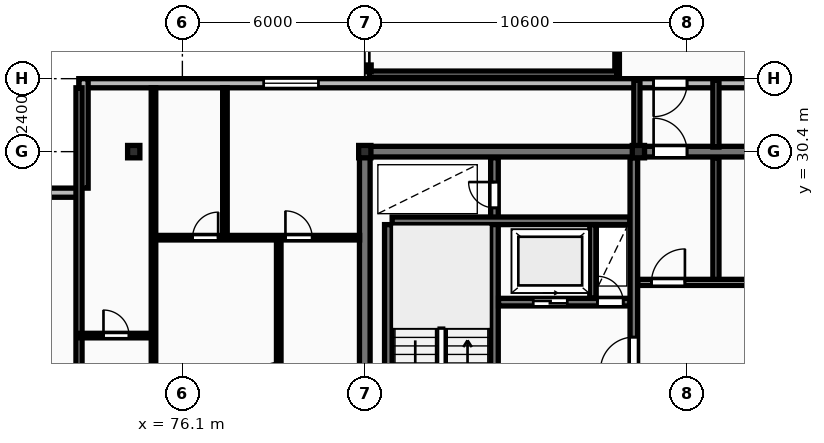
"""IFC4 building model, lengths in metres.
Left out: names, types, materials, properties, quantities, classifications, styles, units other than length and angle.
Written with IfcOpenShell. Run it as: python <this file> out.ifc"""

import sys

from ifc_helpers import new_model, si_unit, direction, frame, frame_2d, origin, origin_2d, place, context, subcontext, project, spatial, rectangle, i_section, extrude, element, fill, save


model = new_model("IFC4")
c1 = context("Model", 3, precision=1e-05, world=origin(), true_north=direction((0.0, 1.0)))
c2 = subcontext(c1, "Body", "Model", "MODEL_VIEW")
j1 = project(units=[si_unit("LENGTHUNIT", "METRE"), si_unit("PLANEANGLEUNIT", "RADIAN")], contexts=[c1])
p1 = place(None, origin())
s1 = spatial("IfcSite", under=j1, at=p1, CompositionType="ELEMENT")
p2 = place(p1, origin())
s2 = spatial("IfcBuilding", under=s1, at=p2, CompositionType="ELEMENT")
p3 = place(p2, frame((0.0, 0.0, 153.7)))
s3 = spatial("IfcBuildingStorey", under=s2, at=p3, CompositionType="ELEMENT", Elevation=153.7)
for number, where, z_axis, x_axis in (
    (1, (74.5, 30.4, 0.0), (0.0, 0.0, 1.0), (1.0, 0.0, 0.0)),
    (2, (82.1, 30.4, 0.0), (0.0, 0.0, 1.0), (1.0, 0.0, 0.0)),
    (3, (91.1, 30.4, 0.0), (0.0, 0.0, 1.0), (1.0, 0.0, 0.0)),
):
    element("IfcColumn", number, at=place(p3, frame(where, z_axis=z_axis, x_axis=x_axis)), inside=s3, PredefinedType="COLUMN", context=c2, shape_type="SweptSolid", body=[
        extrude(i_section(OverallWidth=0.403, OverallDepth=0.406, WebThickness=0.027, FlangeThickness=0.043, FilletRadius=0.015, at=origin_2d()), origin(), (0.0, 0.0, 1.0), 3.6),
    ])
p4 = place(p3, frame((130.7, 32.65, 0.0), z_axis=(0.0, 0.0, 1.0), x_axis=(-1.0, 0.0, 0.0)))
e4 = element("IfcWall", 4, at=p4, inside=s3, PredefinedType="STANDARD", context=c2, shape_type="SweptSolid", body=[
    extrude(rectangle(XDim=58.0, YDim=0.3, at=frame_2d((29.0, 0.0))), origin(), (0.0, 0.0, 1.0), 3.32),
])
p5 = place(p4, frame((50.125, 0.0, 0.85)))
e5 = element("IfcOpeningElement", 5, at=p5, cuts=e4, PredefinedType="OPENING", context=c2, shape_type="SweptSolid", body=[
    extrude(rectangle(XDim=1.8, YDim=1.8, at=frame_2d((0.9, 0.9))), frame((0.0, 0.16, 0.0), z_axis=(0.0, -1.0, 0.0), x_axis=(1.0, 0.0, 0.0)), (0.0, 0.0, 1.0), 0.32),
])
p6 = place(p4, frame((6.775, 0.0, 0.85)))
e6 = element("IfcOpeningElement", 6, at=p6, cuts=e4, PredefinedType="OPENING", context=c2, shape_type="SweptSolid", body=[
    extrude(rectangle(XDim=1.8, YDim=1.8, at=frame_2d((0.9, 0.9))), frame((0.0, 0.16, 0.0), z_axis=(0.0, -1.0, 0.0), x_axis=(1.0, 0.0, 0.0)), (0.0, 0.0, 1.0), 0.32),
])
p7 = place(p4, frame((38.0, 0.0, 0.0)))
e7 = element("IfcOpeningElement", 7, at=p7, cuts=e4, PredefinedType="OPENING", context=c2, shape_type="SweptSolid", body=[
    extrude(rectangle(XDim=1.1, YDim=2.1, at=frame_2d((0.55, 1.05))), frame((0.0, 0.16, 0.0), z_axis=(0.0, -1.0, 0.0), x_axis=(1.0, 0.0, 0.0)), (0.0, 0.0, 1.0), 0.32),
])
p8 = place(p3, frame((72.85, 32.8, 0.0), z_axis=(0.0, 0.0, 1.0), x_axis=(0.0, -1.0, 0.0)))
e8 = element("IfcWall", 8, at=p8, inside=s3, PredefinedType="STANDARD", context=c2, shape_type="SweptSolid", body=[
    extrude(rectangle(XDim=3.6, YDim=0.3, at=frame_2d((1.8, 0.0))), origin(), (0.0, 0.0, 1.0), 3.32),
])
p9 = place(p3, frame((72.7, 29.05, 0.0), z_axis=(0.0, 0.0, 1.0), x_axis=(-1.0, 0.0, 0.0)))
e9 = element("IfcWall", 9, at=p9, inside=s3, PredefinedType="STANDARD", context=c2, shape_type="SweptSolid", body=[
    extrude(rectangle(XDim=3.6, YDim=0.3, at=frame_2d((1.8, 0.0))), origin(), (0.0, 0.0, 1.0), 3.32),
])
p10 = place(p3, frame((81.925, 30.4, 0.0), z_axis=(0.0, 0.0, 1.0), x_axis=(1.0, 0.0, 0.0)))
e10 = element("IfcWall", 10, at=p10, inside=s3, PredefinedType="SHEAR", context=c2, shape_type="SweptSolid", body=[
    extrude(rectangle(XDim=36.265, YDim=0.35, at=frame_2d((18.132, 0.0))), origin(), (0.0, 0.0, 1.0), 3.6),
])
p11 = place(p10, frame((9.675, 0.0, 0.0)))
e11 = element("IfcOpeningElement", 11, at=p11, cuts=e10, PredefinedType="OPENING", context=c2, shape_type="SweptSolid", body=[
    extrude(rectangle(XDim=1.1, YDim=2.1, at=frame_2d((0.55, 1.05))), frame((0.0, 0.185, 0.0), z_axis=(0.0, -1.0, 0.0), x_axis=(1.0, 0.0, 0.0)), (0.0, 0.0, 1.0), 0.37),
])
p12 = place(p3, frame((82.1, 18.575, 0.0), z_axis=(0.0, 0.0, 1.0), x_axis=(0.0, 1.0, 0.0)))
e12 = element("IfcWall", 12, at=p12, inside=s3, PredefinedType="SHEAR", context=c2, shape_type="SweptSolid", body=[
    extrude(rectangle(XDim=11.65, YDim=0.35, at=frame_2d((5.825, 0.0))), origin(), (0.0, 0.0, 1.0), 3.6),
])
p13 = place(p3, frame((82.875, 20.4, 0.0), z_axis=(0.0, 0.0, 1.0), x_axis=(0.0, 1.0, 0.0)))
e13 = element("IfcWall", 13, at=p13, inside=s3, PredefinedType="SHEAR", context=c2, shape_type="SweptSolid", body=[
    extrude(rectangle(XDim=7.6, YDim=0.25, at=frame_2d((3.8, 0.0))), origin(), (0.0, 0.0, 1.0), 3.6),
])
p14 = place(p3, frame((86.365, 18.6, 0.0), z_axis=(0.0, 0.0, 1.0), x_axis=(0.0, 1.0, 0.0)))
e14 = element("IfcWall", 14, at=p14, inside=s3, PredefinedType="SHEAR", context=c2, shape_type="SweptSolid", body=[
    extrude(rectangle(XDim=11.6, YDim=0.25, at=frame_2d((5.8, 0.0))), origin(), (0.0, 0.0, 1.0), 3.6),
])
p15 = place(p14, frame((0.45, 0.0, 0.0)))
e15 = element("IfcOpeningElement", 15, at=p15, cuts=e14, PredefinedType="OPENING", context=c2, shape_type="SweptSolid", body=[
    extrude(rectangle(XDim=0.85, YDim=2.05, at=frame_2d((0.425, 1.025))), frame((0.0, 0.135, 0.0), z_axis=(0.0, -1.0, 0.0), x_axis=(1.0, 0.0, 0.0)), (0.0, 0.0, 1.0), 0.27),
])
p16 = place(p14, frame((2.05, 0.0, 0.0)))
e16 = element("IfcOpeningElement", 16, at=p16, cuts=e14, PredefinedType="OPENING", context=c2, shape_type="SweptSolid", body=[
    extrude(rectangle(XDim=1.1, YDim=2.1, at=frame_2d((0.55, 1.05))), frame((0.0, 0.135, 0.0), z_axis=(0.0, -1.0, 0.0), x_axis=(1.0, 0.0, 0.0)), (0.0, 0.0, 1.0), 0.27),
])
p17 = place(p14, frame((9.95, 0.0, 0.0)))
e17 = element("IfcOpeningElement", 17, at=p17, cuts=e14, PredefinedType="OPENING", context=c2, shape_type="SweptSolid", body=[
    extrude(rectangle(XDim=0.85, YDim=2.05, at=frame_2d((0.425, 1.025))), frame((0.0, 0.135, 0.0), z_axis=(0.0, -1.0, 0.0), x_axis=(1.0, 0.0, 0.0)), (0.0, 0.0, 1.0), 0.27),
])
p18 = place(p3, frame((83.0, 28.125, 0.0), z_axis=(0.0, 0.0, 1.0), x_axis=(1.0, 0.0, 0.0)))
e18 = element("IfcWall", 18, at=p18, inside=s3, PredefinedType="SHEAR", context=c2, shape_type="SweptSolid", body=[
    extrude(rectangle(XDim=7.82, YDim=0.25, at=frame_2d((3.91, 0.0))), origin(), (0.0, 0.0, 1.0), 3.6),
])
p19 = place(p3, frame((86.5, 25.45, 0.0), z_axis=(0.0, 0.0, 1.0), x_axis=(1.0, 0.0, 0.0)))
e19 = element("IfcWall", 19, at=p19, inside=s3, PredefinedType="SHEAR", context=c2, shape_type="SweptSolid", body=[
    extrude(rectangle(XDim=4.32, YDim=0.25, at=frame_2d((2.16, 0.0))), origin(), (0.0, 0.0, 1.0), 3.6),
])
p20 = place(p19, frame((1.14, 0.0, 0.0)))
e20 = element("IfcOpeningElement", 20, at=p20, cuts=e19, PredefinedType="OPENING", context=c2, shape_type="SweptSolid", body=[
    extrude(rectangle(XDim=1.12, YDim=2.12, at=frame_2d((0.56, 1.06))), frame((0.0, 0.135, 0.0), z_axis=(0.0, -1.0, 0.0), x_axis=(1.0, 0.0, 0.0)), (0.0, 0.0, 1.0), 0.27),
])
p21 = place(p19, frame((3.25, 0.0, 0.0)))
e21 = element("IfcOpeningElement", 21, at=p21, cuts=e19, PredefinedType="OPENING", context=c2, shape_type="SweptSolid", body=[
    extrude(rectangle(XDim=0.85, YDim=2.05, at=frame_2d((0.425, 1.025))), frame((0.0, 0.135, 0.0), z_axis=(0.0, -1.0, 0.0), x_axis=(1.0, 0.0, 0.0)), (0.0, 0.0, 1.0), 0.27),
])
p22 = place(p3, frame((89.6, 25.58, 0.0), z_axis=(0.0, 0.0, 1.0), x_axis=(0.0, 1.0, 0.0)))
e22 = element("IfcWall", 22, at=p22, inside=s3, PredefinedType="PARTITIONING", context=c2, shape_type="SweptSolid", body=[
    extrude(rectangle(XDim=2.42, YDim=0.2, at=frame_2d((1.21, 0.0))), origin(), (0.0, 0.0, 1.0), 3.32),
])
p23 = place(p3, frame((90.95, 18.6, 0.0), z_axis=(0.0, 0.0, 1.0), x_axis=(0.0, 1.0, 0.0)))
e23 = element("IfcWall", 23, at=p23, inside=s3, PredefinedType="SHEAR", context=c2, shape_type="SweptSolid", body=[
    extrude(rectangle(XDim=11.6, YDim=0.25, at=frame_2d((5.8, 0.0))), origin(), (0.0, 0.0, 1.0), 3.6),
])
p24 = place(p23, frame((4.6, 0.0, 0.0)))
e24 = element("IfcOpeningElement", 24, at=p24, cuts=e23, PredefinedType="OPENING", context=c2, shape_type="SweptSolid", body=[
    extrude(rectangle(XDim=1.1, YDim=2.1, at=frame_2d((0.55, 1.05))), frame((0.0, 0.135, 0.0), z_axis=(0.0, -1.0, 0.0), x_axis=(1.0, 0.0, 0.0)), (0.0, 0.0, 1.0), 0.27),
])
p25 = place(p3, frame((93.65, 26.1, 0.0), z_axis=(0.0, 0.0, 1.0), x_axis=(0.0, 1.0, 0.0)))
e25 = element("IfcWall", 25, at=p25, inside=s3, PredefinedType="PARTITIONING", context=c2, shape_type="SweptSolid", body=[
    extrude(rectangle(XDim=4.1, YDim=0.2, at=frame_2d((2.05, 0.0))), origin(), (0.0, 0.0, 1.0), 3.32),
])
p26 = place(p3, frame((91.08, 26.1, 0.0), z_axis=(0.0, 0.0, 1.0), x_axis=(1.0, 0.0, 0.0)))
e26 = element("IfcWall", 26, at=p26, inside=s3, PredefinedType="PARTITIONING", context=c2, shape_type="SweptSolid", body=[
    extrude(rectangle(XDim=8.34, YDim=0.2, at=frame_2d((4.17, 0.0))), origin(), (0.0, 0.0, 1.0), 3.32),
])
p27 = place(p26, frame((0.45, 0.0, 0.0)))
e27 = element("IfcOpeningElement", 27, at=p27, cuts=e26, PredefinedType="OPENING", context=c2, shape_type="SweptSolid", body=[
    extrude(rectangle(XDim=1.1, YDim=2.1, at=frame_2d((0.55, 1.05))), frame((0.0, 0.11, 0.0), z_axis=(0.0, -1.0, 0.0), x_axis=(1.0, 0.0, 0.0)), (0.0, 0.0, 1.0), 0.22),
])
p28 = place(p26, frame((4.6, 0.0, 0.0)))
e28 = element("IfcOpeningElement", 28, at=p28, cuts=e26, PredefinedType="OPENING", context=c2, shape_type="SweptSolid", body=[
    extrude(rectangle(XDim=0.92, YDim=2.08, at=frame_2d((0.46, 1.04))), frame((0.0, 0.11, 0.0), z_axis=(0.0, -1.0, 0.0), x_axis=(1.0, 0.0, 0.0)), (0.0, 0.0, 1.0), 0.22),
])
p29 = place(p3, frame((72.7, 18.4, 0.0), z_axis=(0.0, 0.0, 1.0), x_axis=(0.0, 1.0, 0.0)))
e29 = element("IfcWall", 29, at=p29, inside=s3, PredefinedType="PARTITIONING", context=c2, shape_type="SweptSolid", body=[
    extrude(rectangle(XDim=14.1, YDim=0.2, at=frame_2d((7.05, 0.0))), origin(), (0.0, 0.0, 1.0), 3.32),
])
p30 = place(p3, frame((72.7, 24.35, 0.0), z_axis=(0.0, 0.0, 1.0), x_axis=(1.0, 0.0, 0.0)))
e30 = element("IfcWall", 30, at=p30, inside=s3, PredefinedType="PARTITIONING", context=c2, shape_type="SweptSolid", body=[
    extrude(rectangle(XDim=2.45, YDim=0.15, at=frame_2d((1.225, 0.0))), origin(), (0.0, 0.0, 1.0), 3.32),
])
p31 = place(p30, frame((0.805, 0.0, 0.0)))
e31 = element("IfcOpeningElement", 31, at=p31, cuts=e30, PredefinedType="OPENING", context=c2, shape_type="SweptSolid", body=[
    extrude(rectangle(XDim=0.84, YDim=2.04, at=frame_2d((0.42, 1.02))), frame((0.0, 0.085, 0.0), z_axis=(0.0, -1.0, 0.0), x_axis=(1.0, 0.0, 0.0)), (0.0, 0.0, 1.0), 0.17),
])
p32 = place(p3, frame((75.15, 18.45, 0.0), z_axis=(0.0, 0.0, 1.0), x_axis=(0.0, 1.0, 0.0)))
e32 = element("IfcWall", 32, at=p32, inside=s3, PredefinedType="PARTITIONING", context=c2, shape_type="SweptSolid", body=[
    extrude(rectangle(XDim=14.05, YDim=0.15, at=frame_2d((7.025, 0.0))), origin(), (0.0, 0.0, 1.0), 3.32),
])
p33 = place(p32, frame((3.32, 0.0, 0.0)))
e33 = element("IfcOpeningElement", 33, at=p33, cuts=e32, PredefinedType="OPENING", context=c2, shape_type="SweptSolid", body=[
    extrude(rectangle(XDim=0.88, YDim=2.06, at=frame_2d((0.44, 1.03))), frame((0.0, 0.085, 0.0), z_axis=(0.0, -1.0, 0.0), x_axis=(1.0, 0.0, 0.0)), (0.0, 0.0, 1.0), 0.17),
])
p34 = place(p3, frame((79.27, 18.45, 0.0), z_axis=(0.0, 0.0, 1.0), x_axis=(0.0, 1.0, 0.0)))
e34 = element("IfcWall", 34, at=p34, inside=s3, PredefinedType="PARTITIONING", context=c2, shape_type="SweptSolid", body=[
    extrude(rectangle(XDim=9.12, YDim=0.15, at=frame_2d((4.56, 0.0))), origin(), (0.0, 0.0, 1.0), 3.32),
])
p35 = place(p34, frame((4.1, 0.0, 0.0)))
e35 = element("IfcOpeningElement", 35, at=p35, cuts=e34, PredefinedType="OPENING", context=c2, shape_type="SweptSolid", body=[
    extrude(rectangle(XDim=0.92, YDim=2.08, at=frame_2d((0.46, 1.04))), frame((0.0, 0.085, 0.0), z_axis=(0.0, -1.0, 0.0), x_axis=(1.0, 0.0, 0.0)), (0.0, 0.0, 1.0), 0.17),
])
p36 = place(p3, frame((77.5, 27.57, 0.0), z_axis=(0.0, 0.0, 1.0), x_axis=(0.0, 1.0, 0.0)))
e36 = element("IfcWall", 36, at=p36, inside=s3, PredefinedType="PARTITIONING", context=c2, shape_type="SweptSolid", body=[
    extrude(rectangle(XDim=4.93, YDim=0.15, at=frame_2d((2.465, 0.0))), origin(), (0.0, 0.0, 1.0), 3.32),
])
p37 = place(p3, frame((75.17, 27.57, 0.0), z_axis=(0.0, 0.0, 1.0), x_axis=(1.0, 0.0, 0.0)))
e37 = element("IfcWall", 37, at=p37, inside=s3, PredefinedType="PARTITIONING", context=c2, shape_type="SweptSolid", body=[
    extrude(rectangle(XDim=6.76, YDim=0.15, at=frame_2d((3.38, 0.0))), origin(), (0.0, 0.0, 1.0), 3.32),
])
p38 = place(p37, frame((1.266, 0.0, 0.0)))
e38 = element("IfcOpeningElement", 38, at=p38, cuts=e37, PredefinedType="OPENING", context=c2, shape_type="SweptSolid", body=[
    extrude(rectangle(XDim=0.84, YDim=2.04, at=frame_2d((0.42, 1.02))), frame((0.0, 0.085, 0.0), z_axis=(0.0, -1.0, 0.0), x_axis=(1.0, 0.0, 0.0)), (0.0, 0.0, 1.0), 0.17),
])
p39 = place(p37, frame((4.32, 0.0, 0.0)))
e39 = element("IfcOpeningElement", 39, at=p39, cuts=e37, PredefinedType="OPENING", context=c2, shape_type="SweptSolid", body=[
    extrude(rectangle(XDim=0.88, YDim=2.06, at=frame_2d((0.44, 1.03))), frame((0.0, 0.085, 0.0), z_axis=(0.0, -1.0, 0.0), x_axis=(1.0, 0.0, 0.0)), (0.0, 0.0, 1.0), 0.17),
])
p40 = place(p3, frame((91.05, 30.55, 0.0), z_axis=(0.0, 0.0, 1.0), x_axis=(0.0, 1.0, 0.0)))
e40 = element("IfcWall", 40, at=p40, inside=s3, PredefinedType="PARTITIONING", context=c2, shape_type="SweptSolid", body=[
    extrude(rectangle(XDim=2.2, YDim=0.2, at=frame_2d((1.1, 0.0))), origin(), (0.0, 0.0, 1.0), 3.32),
])
p41 = place(p3, frame((93.65, 30.55, 0.0), z_axis=(0.0, 0.0, 1.0), x_axis=(0.0, 1.0, 0.0)))
e41 = element("IfcWall", 41, at=p41, inside=s3, PredefinedType="PARTITIONING", context=c2, shape_type="SweptSolid", body=[
    extrude(rectangle(XDim=2.2, YDim=0.2, at=frame_2d((1.1, 0.0))), origin(), (0.0, 0.0, 1.0), 2.394),
])
p42 = place(p3, frame((90.4, 32.9, 0.0), z_axis=(0.0, 0.0, 1.0), x_axis=(0.0, 1.0, 0.0)))
e42 = element("IfcWall", 42, at=p42, inside=s3, PredefinedType="PARTITIONING", context=c2, shape_type="SweptSolid", body=[
    extrude(rectangle(XDim=17.8, YDim=0.15, at=frame_2d((8.9, 0.0))), origin(), (0.0, 0.0, 1.0), 3.32),
])
p43 = place(p42, frame((8.2, 0.0, 0.0)))
e43 = element("IfcOpeningElement", 43, at=p43, cuts=e42, PredefinedType="OPENING", context=c2, shape_type="SweptSolid", body=[
    extrude(rectangle(XDim=1.22, YDim=2.18, at=frame_2d((0.61, 1.09))), frame((0.0, 0.085, 0.0), z_axis=(0.0, -1.0, 0.0), x_axis=(1.0, 0.0, 0.0)), (0.0, 0.0, 1.0), 0.17),
])
p44 = place(p3, frame((82.25, 32.95, 0.0), z_axis=(0.0, 0.0, 1.0), x_axis=(1.0, 0.0, 0.0)))
e44 = element("IfcWall", 44, at=p44, inside=s3, PredefinedType="PARTITIONING", context=c2, shape_type="SweptSolid", body=[
    extrude(rectangle(XDim=8.15, YDim=0.2, at=frame_2d((4.075, 0.0))), origin(), (0.0, 0.0, 1.0), 2.7),
])
p45 = place(p5, origin())
e45 = element("IfcWindow", 45, at=p45, inside=s3, PartitioningType="SINGLE_PANEL", PredefinedType="WINDOW", context=c2, shape_type="SweptSolid", body=[
    extrude(rectangle(XDim=1.8, YDim=1.8, at=frame_2d((0.9, 0.9))), frame((0.0, 0.03, 0.0), z_axis=(0.0, -1.0, 0.0), x_axis=(1.0, 0.0, 0.0)), (0.0, 0.0, 1.0), 0.06),
])
fill(e5, e45)
p46 = place(p7, origin())
e46 = element("IfcDoor", 46, at=p46, inside=s3, OperationType="SINGLE_SWING_RIGHT", PredefinedType="DOOR", context=c2, shape_type="SweptSolid", body=[
    extrude(rectangle(XDim=1.1, YDim=2.1, at=frame_2d((0.55, 1.05))), frame((0.0, 0.025, 0.0), z_axis=(0.0, -1.0, 0.0), x_axis=(1.0, 0.0, 0.0)), (0.0, 0.0, 1.0), 0.05),
])
fill(e7, e46)
p47 = place(p11, origin())
e47 = element("IfcDoor", 47, at=p47, inside=s3, OperationType="SINGLE_SWING_LEFT", PredefinedType="DOOR", context=c2, shape_type="SweptSolid", body=[
    extrude(rectangle(XDim=1.1, YDim=2.1, at=frame_2d((0.55, 1.05))), frame((0.0, 0.025, 0.0), z_axis=(0.0, -1.0, 0.0), x_axis=(1.0, 0.0, 0.0)), (0.0, 0.0, 1.0), 0.05),
])
fill(e11, e47)
p48 = place(p17, origin())
e48 = element("IfcDoor", 48, at=p48, inside=s3, OperationType="SINGLE_SWING_RIGHT", PredefinedType="DOOR", context=c2, shape_type="SweptSolid", body=[
    extrude(rectangle(XDim=0.85, YDim=2.05, at=frame_2d((0.425, 1.025))), frame((0.0, 0.025, 0.0), z_axis=(0.0, -1.0, 0.0), x_axis=(1.0, 0.0, 0.0)), (0.0, 0.0, 1.0), 0.05),
])
fill(e17, e48)
p49 = place(p20, origin())
e49 = element("IfcDoor", 49, at=p49, inside=s3, OperationType="SLIDING_TO_RIGHT", PredefinedType="DOOR", context=c2, shape_type="SweptSolid", body=[
    extrude(rectangle(XDim=1.12, YDim=2.12, at=frame_2d((0.56, 1.06))), frame((0.0, 0.025, 0.0), z_axis=(0.0, -1.0, 0.0), x_axis=(1.0, 0.0, 0.0)), (0.0, 0.0, 1.0), 0.05),
])
fill(e20, e49)
p50 = place(p21, origin())
e50 = element("IfcDoor", 50, at=p50, inside=s3, OperationType="SINGLE_SWING_LEFT", PredefinedType="DOOR", context=c2, shape_type="SweptSolid", body=[
    extrude(rectangle(XDim=0.85, YDim=2.05, at=frame_2d((0.425, 1.025))), frame((0.0, 0.025, 0.0), z_axis=(0.0, -1.0, 0.0), x_axis=(1.0, 0.0, 0.0)), (0.0, 0.0, 1.0), 0.05),
])
fill(e21, e50)
p51 = place(p24, origin())
e51 = element("IfcDoor", 51, at=p51, inside=s3, OperationType="SINGLE_SWING_LEFT", PredefinedType="DOOR", context=c2, shape_type="SweptSolid", body=[
    extrude(rectangle(XDim=1.1, YDim=2.1, at=frame_2d((0.55, 1.05))), frame((0.0, 0.025, 0.0), z_axis=(0.0, -1.0, 0.0), x_axis=(1.0, 0.0, 0.0)), (0.0, 0.0, 1.0), 0.05),
])
fill(e24, e51)
p52 = place(p27, origin())
e52 = element("IfcDoor", 52, at=p52, inside=s3, OperationType="SINGLE_SWING_RIGHT", PredefinedType="DOOR", context=c2, shape_type="SweptSolid", body=[
    extrude(rectangle(XDim=1.1, YDim=2.1, at=frame_2d((0.55, 1.05))), frame((0.0, 0.025, 0.0), z_axis=(0.0, -1.0, 0.0), x_axis=(1.0, 0.0, 0.0)), (0.0, 0.0, 1.0), 0.05),
])
fill(e27, e52)
p53 = place(p31, origin())
e53 = element("IfcDoor", 53, at=p53, inside=s3, OperationType="SINGLE_SWING_LEFT", PredefinedType="DOOR", context=c2, shape_type="SweptSolid", body=[
    extrude(rectangle(XDim=0.84, YDim=2.04, at=frame_2d((0.42, 1.02))), frame((0.0, 0.025, 0.0), z_axis=(0.0, -1.0, 0.0), x_axis=(1.0, 0.0, 0.0)), (0.0, 0.0, 1.0), 0.05),
])
fill(e31, e53)
p54 = place(p35, origin())
e54 = element("IfcDoor", 54, at=p54, inside=s3, OperationType="SINGLE_SWING_LEFT", PredefinedType="DOOR", context=c2, shape_type="SweptSolid", body=[
    extrude(rectangle(XDim=0.92, YDim=2.08, at=frame_2d((0.46, 1.04))), frame((0.0, 0.025, 0.0), z_axis=(0.0, -1.0, 0.0), x_axis=(1.0, 0.0, 0.0)), (0.0, 0.0, 1.0), 0.05),
])
fill(e35, e54)
p55 = place(p38, origin())
e55 = element("IfcDoor", 55, at=p55, inside=s3, OperationType="SINGLE_SWING_RIGHT", PredefinedType="DOOR", context=c2, shape_type="SweptSolid", body=[
    extrude(rectangle(XDim=0.84, YDim=2.04, at=frame_2d((0.42, 1.02))), frame((0.0, 0.025, 0.0), z_axis=(0.0, -1.0, 0.0), x_axis=(1.0, 0.0, 0.0)), (0.0, 0.0, 1.0), 0.05),
])
fill(e38, e55)
p56 = place(p39, origin())
e56 = element("IfcDoor", 56, at=p56, inside=s3, OperationType="SINGLE_SWING_LEFT", PredefinedType="DOOR", context=c2, shape_type="SweptSolid", body=[
    extrude(rectangle(XDim=0.88, YDim=2.06, at=frame_2d((0.44, 1.03))), frame((0.0, 0.025, 0.0), z_axis=(0.0, -1.0, 0.0), x_axis=(1.0, 0.0, 0.0)), (0.0, 0.0, 1.0), 0.05),
])
fill(e39, e56)
save(model, sys.argv[1])
